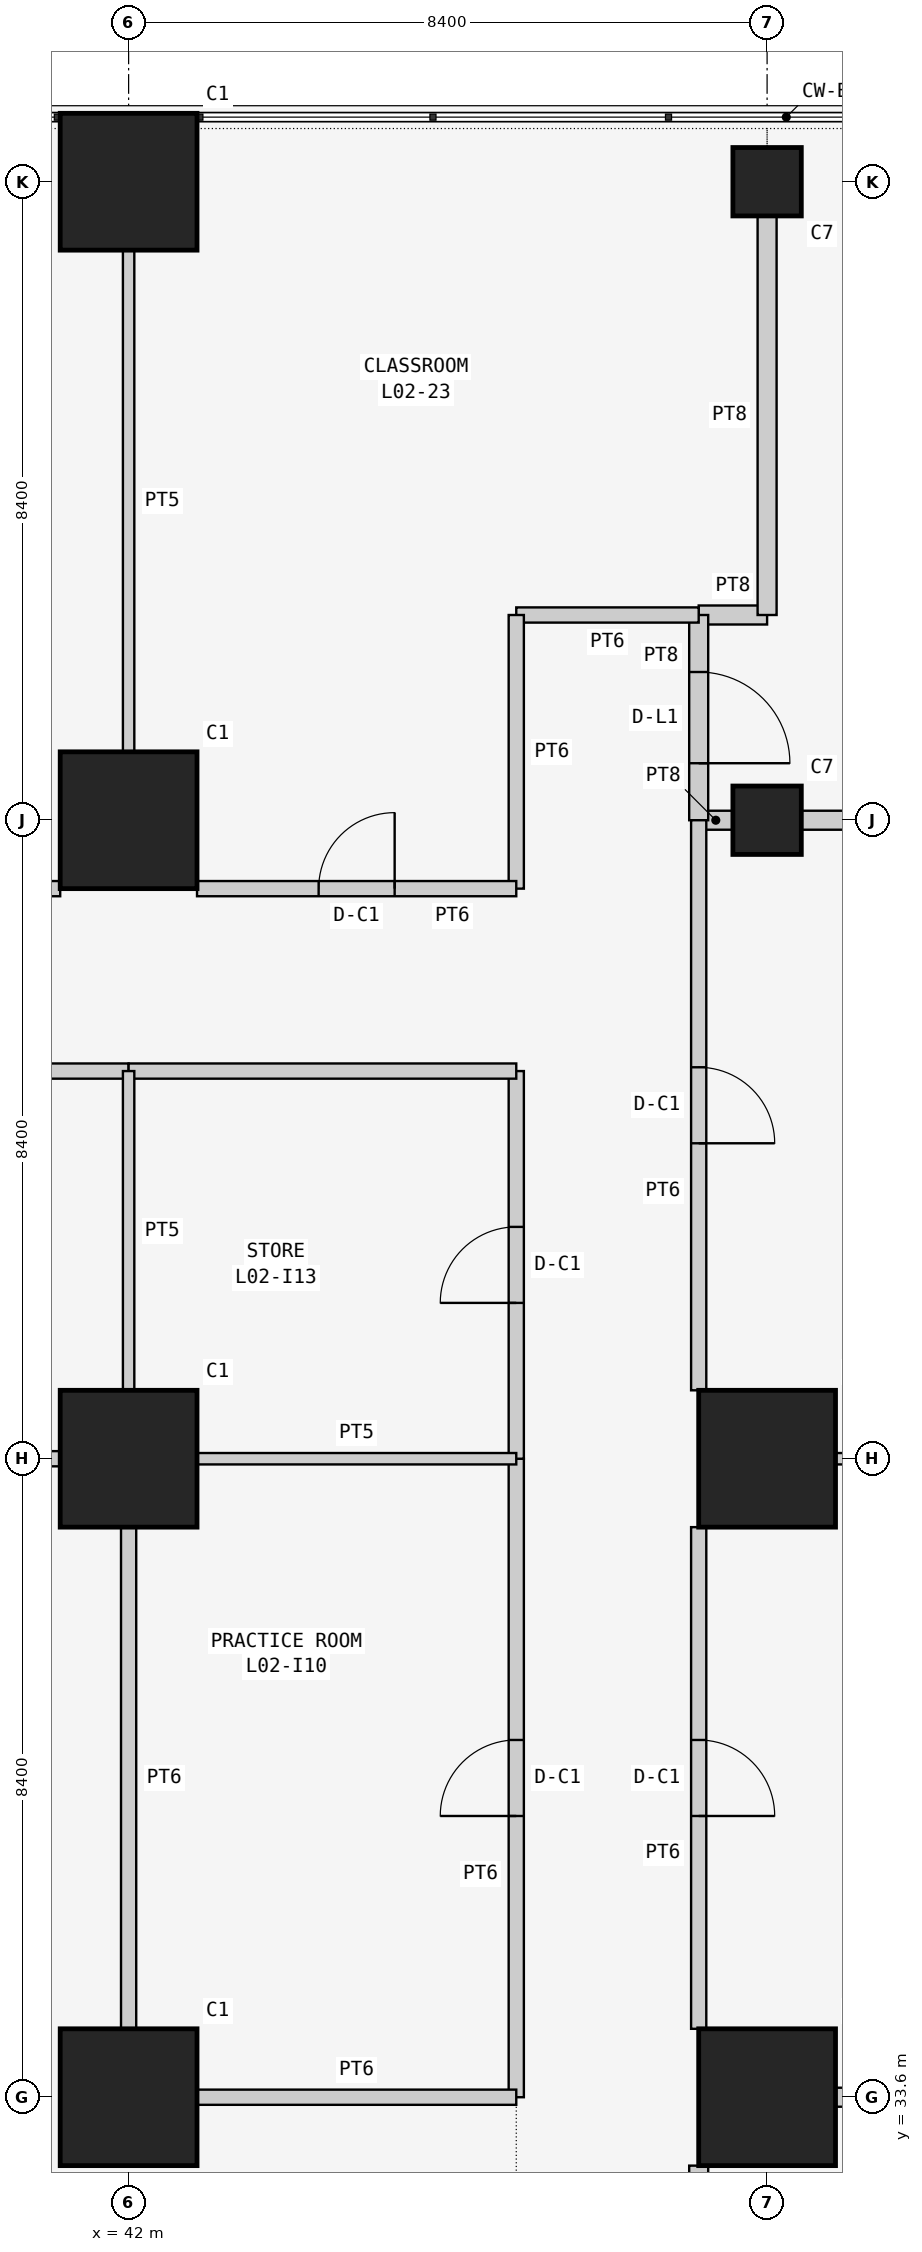
"""IFC4 building model, lengths in metres.
Left out: names, types, materials, properties, quantities, classifications, styles, units other than length and angle.
Written with IfcOpenShell. Run it as: python <this file> out.ifc"""

import sys

from ifc_helpers import new_model, si_unit, direction, frame, frame_2d, origin, origin_2d, place, context, subcontext, project, spatial, rectangle, extrude, element, fill, save


model = new_model("IFC4")
c1 = context("Model", 3, precision=1e-05, world=origin(), true_north=direction((0.0, 1.0)))
c2 = subcontext(c1, "Body", "Model", "MODEL_VIEW")
j1 = project(units=[si_unit("LENGTHUNIT", "METRE"), si_unit("PLANEANGLEUNIT", "RADIAN")], contexts=[c1])
p1 = place(None, origin())
s1 = spatial("IfcSite", under=j1, at=p1, CompositionType="ELEMENT")
p2 = place(p1, origin())
s2 = spatial("IfcBuilding", under=s1, at=p2, CompositionType="ELEMENT")
p3 = place(p2, frame((0.0, 0.0, 10.5)))
s3 = spatial("IfcBuildingStorey", under=s2, at=p3, CompositionType="ELEMENT", Elevation=10.5)
for number, where, z_axis, x_axis in (
    (1, (42.0, 33.6, 0.0), (0.0, 0.0, 1.0), (1.0, 0.0, 0.0)),
    (2, (42.0, 42.0, 0.0), (0.0, 0.0, 1.0), (1.0, 0.0, 0.0)),
    (3, (42.0, 50.4, 0.0), (0.0, 0.0, 1.0), (1.0, 0.0, 0.0)),
    (4, (42.0, 58.8, 0.0), (0.0, 0.0, 1.0), (1.0, 0.0, 0.0)),
    (5, (50.4, 33.6, 0.0), (0.0, 0.0, 1.0), (1.0, 0.0, 0.0)),
    (6, (50.4, 42.0, 0.0), (0.0, 0.0, 1.0), (1.0, 0.0, 0.0)),
):
    element("IfcColumn", number, at=place(p3, frame(where, z_axis=z_axis, x_axis=x_axis)), inside=s3, PredefinedType="COLUMN", context=c2, shape_type="SweptSolid", body=[
        extrude(rectangle(XDim=1.8, YDim=1.8, at=origin_2d()), origin(), (0.0, 0.0, 1.0), 4.5),
    ])
for number, where, z_axis, x_axis in (
    (7, (50.4, 50.4, 0.0), (0.0, 0.0, 1.0), (1.0, 0.0, 0.0)),
    (8, (50.4, 58.8, 0.0), (0.0, 0.0, 1.0), (1.0, 0.0, 0.0)),
):
    element("IfcColumn", number, at=place(p3, frame(where, z_axis=z_axis, x_axis=x_axis)), inside=s3, PredefinedType="COLUMN", context=c2, shape_type="SweptSolid", body=[
        extrude(rectangle(XDim=0.9, YDim=0.9, at=origin_2d()), origin(), (0.0, 0.0, 1.0), 4.5),
    ])
p4 = place(p3, frame((51.3, 33.6, 0.0), z_axis=(0.0, 0.0, 1.0), x_axis=(1.0, 0.0, 0.0)))
e9 = element("IfcWall", 9, at=p4, inside=s3, PredefinedType="SOLIDWALL", context=c2, shape_type="SweptSolid", body=[
    extrude(rectangle(XDim=6.6, YDim=0.25, at=frame_2d((3.3, 0.0))), origin(), (0.0, 0.0, 1.0), 3.543),
])
p5 = place(p3, frame((49.5, 26.1, 0.0), z_axis=(0.0, 0.0, 1.0), x_axis=(0.0, 1.0, 0.0)))
e10 = element("IfcWall", 10, at=p5, inside=s3, PredefinedType="SOLIDWALL", context=c2, shape_type="SweptSolid", body=[
    extrude(rectangle(XDim=6.6, YDim=0.25, at=frame_2d((3.3, 0.0))), origin(), (0.0, 0.0, 1.0), 4.3),
])
p6 = place(p5, frame((2.0, 0.0, 0.0)))
e11 = element("IfcOpeningElement", 11, at=p6, cuts=e10, PredefinedType="OPENING", context=c2, shape_type="SweptSolid", body=[
    extrude(rectangle(XDim=2.6, YDim=2.4, at=frame_2d((1.3, 1.2))), frame((0.0, 0.135, 0.0), z_axis=(0.0, -1.0, 0.0), x_axis=(1.0, 0.0, 0.0)), (0.0, 0.0, 1.0), 0.27),
])
p7 = place(p3, frame((49.95, 50.4, 0.0), z_axis=(0.0, 0.0, 1.0), x_axis=(-1.0, 0.0, 0.0)))
e12 = element("IfcWall", 12, at=p7, inside=s3, PredefinedType="SOLIDWALL", context=c2, shape_type="SweptSolid", body=[
    extrude(rectangle(XDim=0.45, YDim=0.25, at=frame_2d((0.225, 0.0))), origin(), (0.0, 0.0, 1.0), 3.543),
])
p8 = place(p3, frame((58.35, 50.4, 0.0), z_axis=(0.0, 0.0, 1.0), x_axis=(-1.0, 0.0, 0.0)))
e13 = element("IfcWall", 13, at=p8, inside=s3, PredefinedType="SOLIDWALL", context=c2, shape_type="SweptSolid", body=[
    extrude(rectangle(XDim=7.5, YDim=0.25, at=frame_2d((3.75, 0.0))), origin(), (0.0, 0.0, 1.0), 3.543),
])
p9 = place(p3, frame((49.5, 53.1, 0.0), z_axis=(0.0, 0.0, 1.0), x_axis=(1.0, 0.0, 0.0)))
e14 = element("IfcWall", 14, at=p9, inside=s3, PredefinedType="SOLIDWALL", context=c2, shape_type="SweptSolid", body=[
    extrude(rectangle(XDim=0.9, YDim=0.25, at=frame_2d((0.45, 0.0))), origin(), (0.0, 0.0, 1.0), 4.3),
])
p10 = place(p3, frame((50.4, 53.1, 0.0), z_axis=(0.0, 0.0, 1.0), x_axis=(0.0, 1.0, 0.0)))
e15 = element("IfcWall", 15, at=p10, inside=s3, PredefinedType="SOLIDWALL", context=c2, shape_type="SweptSolid", body=[
    extrude(rectangle(XDim=5.25, YDim=0.25, at=frame_2d((2.625, 0.0))), origin(), (0.0, 0.0, 1.0), 3.543),
])
p11 = place(p3, frame((49.5, 50.4, 0.0), z_axis=(0.0, 0.0, 1.0), x_axis=(0.0, 1.0, 0.0)))
e16 = element("IfcWall", 16, at=p11, inside=s3, PredefinedType="SOLIDWALL", context=c2, shape_type="SweptSolid", body=[
    extrude(rectangle(XDim=2.7, YDim=0.25, at=frame_2d((1.35, 0.0))), origin(), (0.0, 0.0, 1.0), 4.3),
])
p12 = place(p11, frame((0.75, 0.0, 0.0)))
e17 = element("IfcOpeningElement", 17, at=p12, cuts=e16, PredefinedType="OPENING", context=c2, shape_type="SweptSolid", body=[
    extrude(rectangle(XDim=1.2, YDim=2.1, at=frame_2d((0.6, 1.05))), frame((0.0, 0.135, 0.0), z_axis=(0.0, -1.0, 0.0), x_axis=(1.0, 0.0, 0.0)), (0.0, 0.0, 1.0), 0.27),
])
p13 = place(p3, frame((51.3, 42.0, 0.0), z_axis=(0.0, 0.0, 1.0), x_axis=(1.0, 0.0, 0.0)))
e18 = element("IfcWall", 18, at=p13, inside=s3, PredefinedType="PARTITIONING", context=c2, shape_type="SweptSolid", body=[
    extrude(rectangle(XDim=6.6, YDim=0.15, at=frame_2d((3.3, 0.0))), origin(), (0.0, 0.0, 1.0), 3.543),
])
p14 = place(p3, frame((49.5, 34.5, 0.0), z_axis=(0.0, 0.0, 1.0), x_axis=(0.0, 1.0, 0.0)))
e19 = element("IfcWall", 19, at=p14, inside=s3, PredefinedType="PARTITIONING", context=c2, shape_type="SweptSolid", body=[
    extrude(rectangle(XDim=6.6, YDim=0.2, at=frame_2d((3.3, 0.0))), origin(), (0.0, 0.0, 1.0), 4.3),
])
p15 = place(p14, frame((2.8, 0.0, 0.0)))
e20 = element("IfcOpeningElement", 20, at=p15, cuts=e19, PredefinedType="OPENING", context=c2, shape_type="SweptSolid", body=[
    extrude(rectangle(XDim=1.0, YDim=2.1, at=frame_2d((0.5, 1.05))), frame((0.0, 0.11, 0.0), z_axis=(0.0, -1.0, 0.0), x_axis=(1.0, 0.0, 0.0)), (0.0, 0.0, 1.0), 0.22),
])
p16 = place(p3, frame((49.5, 42.9, 0.0), z_axis=(0.0, 0.0, 1.0), x_axis=(0.0, 1.0, 0.0)))
e21 = element("IfcWall", 21, at=p16, inside=s3, PredefinedType="PARTITIONING", context=c2, shape_type="SweptSolid", body=[
    extrude(rectangle(XDim=7.5, YDim=0.2, at=frame_2d((3.75, 0.0))), origin(), (0.0, 0.0, 1.0), 4.3),
])
p17 = place(p16, frame((3.25, 0.0, 0.0)))
e22 = element("IfcOpeningElement", 22, at=p17, cuts=e21, PredefinedType="OPENING", context=c2, shape_type="SweptSolid", body=[
    extrude(rectangle(XDim=1.0, YDim=2.1, at=frame_2d((0.5, 1.05))), frame((0.0, 0.11, 0.0), z_axis=(0.0, -1.0, 0.0), x_axis=(1.0, 0.0, 0.0)), (0.0, 0.0, 1.0), 0.22),
])
p18 = place(p3, frame((42.0, 57.9, 0.0), z_axis=(0.0, 0.0, 1.0), x_axis=(0.0, -1.0, 0.0)))
e23 = element("IfcWall", 23, at=p18, inside=s3, PredefinedType="PARTITIONING", context=c2, shape_type="SweptSolid", body=[
    extrude(rectangle(XDim=6.6, YDim=0.15, at=frame_2d((3.3, 0.0))), origin(), (0.0, 0.0, 1.0), 3.543),
])
p19 = place(p3, frame((41.1, 49.5, 0.0), z_axis=(0.0, 0.0, 1.0), x_axis=(-1.0, 0.0, 0.0)))
e24 = element("IfcWall", 24, at=p19, inside=s3, PredefinedType="PARTITIONING", context=c2, shape_type="SweptSolid", body=[
    extrude(rectangle(XDim=6.6, YDim=0.2, at=frame_2d((3.3, 0.0))), origin(), (0.0, 0.0, 1.0), 4.3),
])
p20 = place(p19, frame((2.8, 0.0, 0.0)))
e25 = element("IfcOpeningElement", 25, at=p20, cuts=e24, PredefinedType="OPENING", context=c2, shape_type="SweptSolid", body=[
    extrude(rectangle(XDim=1.0, YDim=2.1, at=frame_2d((0.5, 1.05))), frame((0.0, 0.11, 0.0), z_axis=(0.0, -1.0, 0.0), x_axis=(1.0, 0.0, 0.0)), (0.0, 0.0, 1.0), 0.22),
])
p21 = place(p3, frame((49.5, 53.1, 0.0), z_axis=(0.0, 0.0, 1.0), x_axis=(-1.0, 0.0, 0.0)))
e26 = element("IfcWall", 26, at=p21, inside=s3, PredefinedType="PARTITIONING", context=c2, shape_type="SweptSolid", body=[
    extrude(rectangle(XDim=2.4, YDim=0.2, at=frame_2d((1.2, 0.0))), origin(), (0.0, 0.0, 1.0), 4.3),
])
p22 = place(p3, frame((47.1, 53.1, 0.0), z_axis=(0.0, 0.0, 1.0), x_axis=(0.0, -1.0, 0.0)))
e27 = element("IfcWall", 27, at=p22, inside=s3, PredefinedType="PARTITIONING", context=c2, shape_type="SweptSolid", body=[
    extrude(rectangle(XDim=3.6, YDim=0.2, at=frame_2d((1.8, 0.0))), origin(), (0.0, 0.0, 1.0), 4.3),
])
p23 = place(p3, frame((47.1, 49.5, 0.0), z_axis=(0.0, 0.0, 1.0), x_axis=(-1.0, 0.0, 0.0)))
e28 = element("IfcWall", 28, at=p23, inside=s3, PredefinedType="PARTITIONING", context=c2, shape_type="SweptSolid", body=[
    extrude(rectangle(XDim=4.2, YDim=0.2, at=frame_2d((2.1, 0.0))), origin(), (0.0, 0.0, 1.0), 4.3),
])
p24 = place(p23, frame((1.6, 0.0, 0.0)))
e29 = element("IfcOpeningElement", 29, at=p24, cuts=e28, PredefinedType="OPENING", context=c2, shape_type="SweptSolid", body=[
    extrude(rectangle(XDim=1.0, YDim=2.1, at=frame_2d((0.5, 1.05))), frame((0.0, 0.11, 0.0), z_axis=(0.0, -1.0, 0.0), x_axis=(1.0, 0.0, 0.0)), (0.0, 0.0, 1.0), 0.22),
])
p25 = place(p3, frame((47.1, 33.6, 0.0), z_axis=(0.0, 0.0, 1.0), x_axis=(0.0, 1.0, 0.0)))
e30 = element("IfcWall", 30, at=p25, inside=s3, PredefinedType="PARTITIONING", context=c2, shape_type="SweptSolid", body=[
    extrude(rectangle(XDim=8.4, YDim=0.2, at=frame_2d((4.2, 0.0))), origin(), (0.0, 0.0, 1.0), 4.3),
])
p26 = place(p25, frame((3.7, 0.0, 0.0)))
e31 = element("IfcOpeningElement", 31, at=p26, cuts=e30, PredefinedType="OPENING", context=c2, shape_type="SweptSolid", body=[
    extrude(rectangle(XDim=1.0, YDim=2.1, at=frame_2d((0.5, 1.05))), frame((0.0, 0.11, 0.0), z_axis=(0.0, -1.0, 0.0), x_axis=(1.0, 0.0, 0.0)), (0.0, 0.0, 1.0), 0.22),
])
p27 = place(p3, frame((42.0, 47.1, 0.0), z_axis=(0.0, 0.0, 1.0), x_axis=(-1.0, 0.0, 0.0)))
e32 = element("IfcWall", 32, at=p27, inside=s3, PredefinedType="PARTITIONING", context=c2, shape_type="SweptSolid", body=[
    extrude(rectangle(XDim=16.8, YDim=0.2, at=frame_2d((8.4, 0.0))), origin(), (0.0, 0.0, 1.0), 4.3),
])
p28 = place(p27, frame((7.9, 0.0, 0.0)))
e33 = element("IfcOpeningElement", 33, at=p28, cuts=e32, PredefinedType="OPENING", context=c2, shape_type="SweptSolid", body=[
    extrude(rectangle(XDim=1.0, YDim=2.1, at=frame_2d((0.5, 1.05))), frame((0.0, 0.11, 0.0), z_axis=(0.0, -1.0, 0.0), x_axis=(1.0, 0.0, 0.0)), (0.0, 0.0, 1.0), 0.22),
])
p29 = place(p3, frame((47.1, 42.0, 0.0), z_axis=(0.0, 0.0, 1.0), x_axis=(0.0, 1.0, 0.0)))
e34 = element("IfcWall", 34, at=p29, inside=s3, PredefinedType="PARTITIONING", context=c2, shape_type="SweptSolid", body=[
    extrude(rectangle(XDim=5.1, YDim=0.2, at=frame_2d((2.55, 0.0))), origin(), (0.0, 0.0, 1.0), 4.3),
])
p30 = place(p29, frame((2.05, 0.0, 0.0)))
e35 = element("IfcOpeningElement", 35, at=p30, cuts=e34, PredefinedType="OPENING", context=c2, shape_type="SweptSolid", body=[
    extrude(rectangle(XDim=1.0, YDim=2.1, at=frame_2d((0.5, 1.05))), frame((0.0, 0.11, 0.0), z_axis=(0.0, -1.0, 0.0), x_axis=(1.0, 0.0, 0.0)), (0.0, 0.0, 1.0), 0.22),
])
p31 = place(p3, frame((47.1, 47.1, 0.0), z_axis=(0.0, 0.0, 1.0), x_axis=(-1.0, 0.0, 0.0)))
e36 = element("IfcWall", 36, at=p31, inside=s3, PredefinedType="PARTITIONING", context=c2, shape_type="SweptSolid", body=[
    extrude(rectangle(XDim=5.1, YDim=0.2, at=frame_2d((2.55, 0.0))), origin(), (0.0, 0.0, 1.0), 4.3),
])
p32 = place(p3, frame((42.0, 41.1, 0.0), z_axis=(0.0, 0.0, 1.0), x_axis=(0.0, -1.0, 0.0)))
e37 = element("IfcWall", 37, at=p32, inside=s3, PredefinedType="PARTITIONING", context=c2, shape_type="SweptSolid", body=[
    extrude(rectangle(XDim=6.6, YDim=0.2, at=frame_2d((3.3, 0.0))), origin(), (0.0, 0.0, 1.0), 3.543),
])
p33 = place(p3, frame((42.9, 33.6, 0.0), z_axis=(0.0, 0.0, 1.0), x_axis=(1.0, 0.0, 0.0)))
e38 = element("IfcWall", 38, at=p33, inside=s3, PredefinedType="PARTITIONING", context=c2, shape_type="SweptSolid", body=[
    extrude(rectangle(XDim=4.2, YDim=0.2, at=frame_2d((2.1, 0.0))), origin(), (0.0, 0.0, 1.0), 3.543),
])
p34 = place(p3, frame((34.5, 42.0, 0.0), z_axis=(0.0, 0.0, 1.0), x_axis=(1.0, 0.0, 0.0)))
e39 = element("IfcWall", 39, at=p34, inside=s3, PredefinedType="PARTITIONING", context=c2, shape_type="SweptSolid", body=[
    extrude(rectangle(XDim=6.6, YDim=0.2, at=frame_2d((3.3, 0.0))), origin(), (0.0, 0.0, 1.0), 3.543),
])
for number, where, z_axis, x_axis in (
    (40, (42.9, 42.0, 0.0), (0.0, 0.0, 1.0), (1.0, 0.0, 0.0)),
    (41, (42.0, 47.1, 0.0), (0.0, 0.0, 1.0), (0.0, -1.0, 0.0)),
):
    element("IfcWall", number, at=place(p3, frame(where, z_axis=z_axis, x_axis=x_axis)), inside=s3, PredefinedType="PARTITIONING", context=c2, shape_type="SweptSolid", body=[
        extrude(rectangle(XDim=4.2, YDim=0.15, at=frame_2d((2.1, 0.0))), origin(), (0.0, 0.0, 1.0), 3.543),
    ])
p35 = place(p12, frame((1.2, 0.0, 0.0), z_axis=(0.0, 0.0, 1.0), x_axis=(-1.0, 0.0, 0.0)))
e42 = element("IfcDoor", 42, at=p35, inside=s3, OperationType="SINGLE_SWING_RIGHT", PredefinedType="DOOR", context=c2, shape_type="SweptSolid", body=[
    extrude(rectangle(XDim=1.2, YDim=2.1, at=frame_2d((0.6, 1.05))), frame((0.0, 0.025, 0.0), z_axis=(0.0, -1.0, 0.0), x_axis=(1.0, 0.0, 0.0)), (0.0, 0.0, 1.0), 0.05),
])
fill(e17, e42)
p36 = place(p15, frame((1.0, 0.0, 0.0), z_axis=(0.0, 0.0, 1.0), x_axis=(-1.0, 0.0, 0.0)))
e43 = element("IfcDoor", 43, at=p36, inside=s3, OperationType="SINGLE_SWING_RIGHT", PredefinedType="DOOR", context=c2, shape_type="SweptSolid", body=[
    extrude(rectangle(XDim=1.0, YDim=2.1, at=frame_2d((0.5, 1.05))), frame((0.0, 0.025, 0.0), z_axis=(0.0, -1.0, 0.0), x_axis=(1.0, 0.0, 0.0)), (0.0, 0.0, 1.0), 0.05),
])
fill(e20, e43)
p37 = place(p17, frame((1.0, 0.0, 0.0), z_axis=(0.0, 0.0, 1.0), x_axis=(-1.0, 0.0, 0.0)))
e44 = element("IfcDoor", 44, at=p37, inside=s3, OperationType="SINGLE_SWING_RIGHT", PredefinedType="DOOR", context=c2, shape_type="SweptSolid", body=[
    extrude(rectangle(XDim=1.0, YDim=2.1, at=frame_2d((0.5, 1.05))), frame((0.0, 0.025, 0.0), z_axis=(0.0, -1.0, 0.0), x_axis=(1.0, 0.0, 0.0)), (0.0, 0.0, 1.0), 0.05),
])
fill(e22, e44)
p38 = place(p24, frame((1.0, 0.0, 0.0), z_axis=(0.0, 0.0, 1.0), x_axis=(-1.0, 0.0, 0.0)))
e45 = element("IfcDoor", 45, at=p38, inside=s3, OperationType="SINGLE_SWING_RIGHT", PredefinedType="DOOR", context=c2, shape_type="SweptSolid", body=[
    extrude(rectangle(XDim=1.0, YDim=2.1, at=frame_2d((0.5, 1.05))), frame((0.0, 0.025, 0.0), z_axis=(0.0, -1.0, 0.0), x_axis=(1.0, 0.0, 0.0)), (0.0, 0.0, 1.0), 0.05),
])
fill(e29, e45)
p39 = place(p26, origin())
e46 = element("IfcDoor", 46, at=p39, inside=s3, OperationType="SINGLE_SWING_LEFT", PredefinedType="DOOR", context=c2, shape_type="SweptSolid", body=[
    extrude(rectangle(XDim=1.0, YDim=2.1, at=frame_2d((0.5, 1.05))), frame((0.0, 0.025, 0.0), z_axis=(0.0, -1.0, 0.0), x_axis=(1.0, 0.0, 0.0)), (0.0, 0.0, 1.0), 0.05),
])
fill(e31, e46)
p40 = place(p30, origin())
e47 = element("IfcDoor", 47, at=p40, inside=s3, OperationType="SINGLE_SWING_LEFT", PredefinedType="DOOR", context=c2, shape_type="SweptSolid", body=[
    extrude(rectangle(XDim=1.0, YDim=2.1, at=frame_2d((0.5, 1.05))), frame((0.0, 0.025, 0.0), z_axis=(0.0, -1.0, 0.0), x_axis=(1.0, 0.0, 0.0)), (0.0, 0.0, 1.0), 0.05),
])
fill(e35, e47)
save(model, sys.argv[1])
